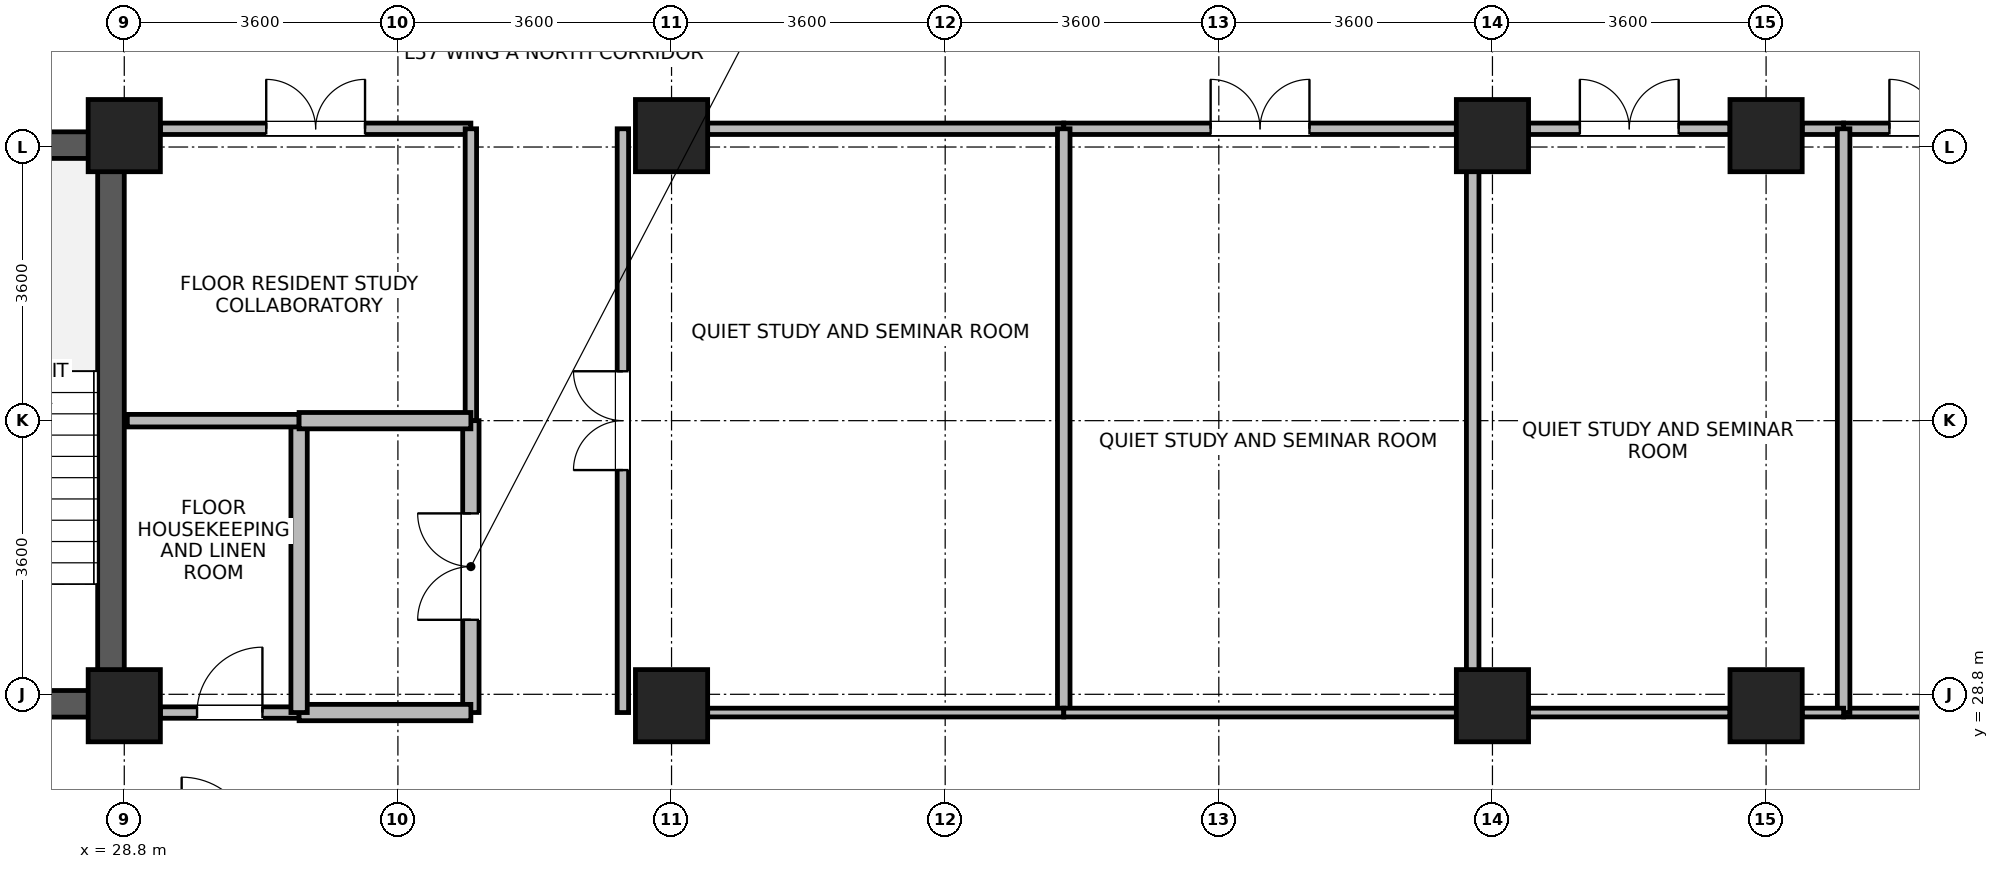
"""IFC4 building model, lengths in metres.
Left out: names, types, materials, properties, quantities, classifications, styles, units other than length and angle.
Written with IfcOpenShell. Run it as: python <this file> out.ifc"""

import sys

from ifc_helpers import new_model, si_unit, direction, frame, frame_2d, origin, origin_2d, place, context, subcontext, project, spatial, rectangle, extrude, source, transform, mapped, element, fill, save


model = new_model("IFC4")
c1 = context("Model", 3, precision=1e-05, world=origin(), true_north=direction((0.0, 1.0)))
c2 = subcontext(c1, "Body", "Model", "MODEL_VIEW")
j1 = project(units=[si_unit("LENGTHUNIT", "METRE"), si_unit("PLANEANGLEUNIT", "RADIAN")], contexts=[c1])
p1 = place(None, origin())
s1 = spatial("IfcSite", under=j1, at=p1, CompositionType="ELEMENT")
p2 = place(p1, origin())
s2 = spatial("IfcBuilding", under=s1, at=p2, CompositionType="ELEMENT")
p3 = place(p2, frame((0.0, 0.0, 224.0)))
s3 = spatial("IfcBuildingStorey", under=s2, at=p3, CompositionType="ELEMENT", Elevation=224.0)
p4 = place(p3, frame((28.625, 28.5, 0.0), z_axis=(0.0, 0.0, 1.0), x_axis=(0.0, 1.0, 0.0)))
e1 = element("IfcWall", 1, at=p4, inside=s3, PredefinedType="SHEAR", context=c2, shape_type="SweptSolid", body=[
    extrude(rectangle(XDim=7.7, YDim=0.35, at=frame_2d((3.85, 0.0))), origin(), (0.0, 0.0, 1.0), 3.47),
])
for number, where, z_axis, x_axis in (
    (2, (25.25, 28.675, 0.0), (0.0, 0.0, 1.0), (1.0, 0.0, 0.0)),
    (3, (25.25, 36.025, 0.0), (0.0, 0.0, 1.0), (1.0, 0.0, 0.0)),
):
    element("IfcWall", number, at=place(p3, frame(where, z_axis=z_axis, x_axis=x_axis)), inside=s3, PredefinedType="SHEAR", context=c2, shape_type="SweptSolid", body=[
        extrude(rectangle(XDim=3.2, YDim=0.35, at=frame_2d((1.6, 0.0))), origin(), (0.0, 0.0, 1.0), 3.47),
    ])
m1 = source(origin(), c2, "Body", "SweptSolid", [
    extrude(rectangle(XDim=0.95, YDim=0.95, at=origin_2d()), origin(), (0.0, 0.0, 1.0), 3.7),
])
for number, where, z_axis, x_axis in (
    (4, (28.8, 28.65, 0.0), (0.0, 0.0, 1.0), (1.0, 0.0, 0.0)),
    (5, (28.8, 36.15, 0.0), (0.0, 0.0, 1.0), (1.0, 0.0, 0.0)),
    (6, (36.0, 28.65, 0.0), (0.0, 0.0, 1.0), (1.0, 0.0, 0.0)),
    (7, (36.0, 36.15, 0.0), (0.0, 0.0, 1.0), (1.0, 0.0, 0.0)),
    (8, (46.8, 28.65, 0.0), (0.0, 0.0, 1.0), (1.0, 0.0, 0.0)),
    (9, (46.8, 36.15, 0.0), (0.0, 0.0, 1.0), (1.0, 0.0, 0.0)),
    (10, (50.4, 28.65, 0.0), (0.0, 0.0, 1.0), (1.0, 0.0, 0.0)),
    (11, (50.4, 36.15, 0.0), (0.0, 0.0, 1.0), (1.0, 0.0, 0.0)),
):
    element("IfcColumn", number, at=place(p3, frame(where, z_axis=z_axis, x_axis=x_axis)), inside=s3, PredefinedType="COLUMN", context=c2, shape_type="MappedRepresentation", body=[
        mapped(m1, transform((0.0, 0.0, 0.0), x_axis=(1.0, 0.0, 0.0), y_axis=(0.0, 1.0, 0.0), z_axis=(0.0, 0.0, 1.0), scale=1.0)),
    ])
p5 = place(p3, frame((51.42, 36.24, 0.0), z_axis=(0.0, 0.0, 1.0), x_axis=(1.0, 0.0, 0.0)))
e12 = element("IfcWall", 12, at=p5, inside=s3, PredefinedType="PARTITIONING", context=c2, shape_type="SweptSolid", body=[
    extrude(rectangle(XDim=2.505, YDim=0.15, at=frame_2d((1.252, 0.0))), origin(), (0.0, 0.0, 1.0), 2.9),
])
p6 = place(p5, frame((0.603, 0.0, 0.0)))
e13 = element("IfcOpeningElement", 13, at=p6, cuts=e12, PredefinedType="OPENING", context=c2, shape_type="SweptSolid", body=[
    extrude(rectangle(XDim=1.3, YDim=2.12, at=frame_2d((0.65, 1.06))), frame((0.0, 0.085, 0.0), z_axis=(0.0, -1.0, 0.0), x_axis=(1.0, 0.0, 0.0)), (0.0, 0.0, 1.0), 0.17),
])
p7 = place(p3, frame((35.36, 28.56, 0.0), z_axis=(0.0, 0.0, 1.0), x_axis=(0.0, 1.0, 0.0)))
e14 = element("IfcWall", 14, at=p7, inside=s3, PredefinedType="PARTITIONING", context=c2, shape_type="SweptSolid", body=[
    extrude(rectangle(XDim=7.68, YDim=0.15, at=frame_2d((3.84, 0.0))), origin(), (0.0, 0.0, 1.0), 3.45),
])
p8 = place(p7, frame((3.19, 0.0, 0.0)))
e15 = element("IfcOpeningElement", 15, at=p8, cuts=e14, PredefinedType="OPENING", context=c2, shape_type="SweptSolid", body=[
    extrude(rectangle(XDim=1.3, YDim=2.12, at=frame_2d((0.65, 1.06))), frame((0.0, 0.085, 0.0), z_axis=(0.0, -1.0, 0.0), x_axis=(1.0, 0.0, 0.0)), (0.0, 0.0, 1.0), 0.17),
])
p9 = place(p3, frame((36.475, 36.24, 0.0), z_axis=(0.0, 0.0, 1.0), x_axis=(1.0, 0.0, 0.0)))
e16 = element("IfcWall", 16, at=p9, inside=s3, PredefinedType="PARTITIONING", context=c2, shape_type="SweptSolid", body=[
    extrude(rectangle(XDim=4.685, YDim=0.15, at=frame_2d((2.342, 0.0))), origin(), (0.0, 0.0, 1.0), 2.9),
])
p10 = place(p3, frame((41.16, 36.24, 0.0), z_axis=(0.0, 0.0, 1.0), x_axis=(1.0, 0.0, 0.0)))
e17 = element("IfcWall", 17, at=p10, inside=s3, PredefinedType="PARTITIONING", context=c2, shape_type="SweptSolid", body=[
    extrude(rectangle(XDim=5.165, YDim=0.15, at=frame_2d((2.583, 0.0))), origin(), (0.0, 0.0, 1.0), 2.9),
])
p11 = place(p10, frame((1.933, 0.0, 0.0)))
e18 = element("IfcOpeningElement", 18, at=p11, cuts=e17, PredefinedType="OPENING", context=c2, shape_type="SweptSolid", body=[
    extrude(rectangle(XDim=1.3, YDim=2.12, at=frame_2d((0.65, 1.06))), frame((0.0, 0.085, 0.0), z_axis=(0.0, -1.0, 0.0), x_axis=(1.0, 0.0, 0.0)), (0.0, 0.0, 1.0), 0.17),
])
p12 = place(p3, frame((47.275, 36.24, 0.0), z_axis=(0.0, 0.0, 1.0), x_axis=(1.0, 0.0, 0.0)))
e19 = element("IfcWall", 19, at=p12, inside=s3, PredefinedType="PARTITIONING", context=c2, shape_type="SweptSolid", body=[
    extrude(rectangle(XDim=2.65, YDim=0.15, at=frame_2d((1.325, 0.0))), origin(), (0.0, 0.0, 1.0), 2.9),
])
p13 = place(p12, frame((0.675, 0.0, 0.0)))
e20 = element("IfcOpeningElement", 20, at=p13, cuts=e19, PredefinedType="OPENING", context=c2, shape_type="SweptSolid", body=[
    extrude(rectangle(XDim=1.3, YDim=2.12, at=frame_2d((0.65, 1.06))), frame((0.0, 0.085, 0.0), z_axis=(0.0, -1.0, 0.0), x_axis=(1.0, 0.0, 0.0)), (0.0, 0.0, 1.0), 0.17),
])
p14 = place(p3, frame((50.875, 36.24, 0.0), z_axis=(0.0, 0.0, 1.0), x_axis=(1.0, 0.0, 0.0)))
e21 = element("IfcWall", 21, at=p14, inside=s3, PredefinedType="PARTITIONING", context=c2, shape_type="SweptSolid", body=[
    extrude(rectangle(XDim=0.545, YDim=0.15, at=frame_2d((0.272, 0.0))), origin(), (0.0, 0.0, 1.0), 2.9),
])
p15 = place(p3, frame((29.275, 36.24, 0.0), z_axis=(0.0, 0.0, 1.0), x_axis=(1.0, 0.0, 0.0)))
e22 = element("IfcWall", 22, at=p15, inside=s3, PredefinedType="PARTITIONING", context=c2, shape_type="SweptSolid", body=[
    extrude(rectangle(XDim=4.085, YDim=0.15, at=frame_2d((2.042, 0.0))), origin(), (0.0, 0.0, 1.0), 2.9),
])
p16 = place(p15, frame((1.393, 0.0, 0.0)))
e23 = element("IfcOpeningElement", 23, at=p16, cuts=e22, PredefinedType="OPENING", context=c2, shape_type="SweptSolid", body=[
    extrude(rectangle(XDim=1.3, YDim=2.12, at=frame_2d((0.65, 1.06))), frame((0.0, 0.085, 0.0), z_axis=(0.0, -1.0, 0.0), x_axis=(1.0, 0.0, 0.0)), (0.0, 0.0, 1.0), 0.17),
])
p17 = place(p3, frame((33.36, 32.4, 0.0), z_axis=(0.0, 0.0, 1.0), x_axis=(0.0, 1.0, 0.0)))
e24 = element("IfcWall", 24, at=p17, inside=s3, PredefinedType="PARTITIONING", context=c2, shape_type="SweptSolid", body=[
    extrude(rectangle(XDim=3.84, YDim=0.15, at=frame_2d((1.92, 0.0))), origin(), (0.0, 0.0, 1.0), 3.45),
])
p18 = place(p3, frame((33.36, 28.56, 0.0), z_axis=(0.0, 0.0, 1.0), x_axis=(0.0, 1.0, 0.0)))
e25 = element("IfcWall", 25, at=p18, inside=s3, PredefinedType="PARTITIONING", context=c2, shape_type="SweptSolid", body=[
    extrude(rectangle(XDim=3.84, YDim=0.215, at=frame_2d((1.92, 0.0))), origin(), (0.0, 0.0, 1.0), 3.45),
])
p19 = place(p18, frame((1.22, 0.0, 0.0)))
e26 = element("IfcOpeningElement", 26, at=p19, cuts=e25, PredefinedType="OPENING", context=c2, shape_type="SweptSolid", body=[
    extrude(rectangle(XDim=1.4, YDim=2.15, at=frame_2d((0.7, 1.075))), frame((0.0, 0.118, 0.0), z_axis=(0.0, -1.0, 0.0), x_axis=(1.0, 0.0, 0.0)), (0.0, 0.0, 1.0), 0.235),
])
p20 = place(p3, frame((29.275, 28.56, 0.0), z_axis=(0.0, 0.0, 1.0), x_axis=(1.0, 0.0, 0.0)))
e27 = element("IfcWall", 27, at=p20, inside=s3, PredefinedType="PARTITIONING", context=c2, shape_type="SweptSolid", body=[
    extrude(rectangle(XDim=1.825, YDim=0.15, at=frame_2d((0.913, 0.0))), origin(), (0.0, 0.0, 1.0), 2.9),
])
p21 = place(p20, frame((0.482, 0.0, 0.0)))
e28 = element("IfcOpeningElement", 28, at=p21, cuts=e27, PredefinedType="OPENING", context=c2, shape_type="SweptSolid", body=[
    extrude(rectangle(XDim=0.86, YDim=2.02, at=frame_2d((0.43, 1.01))), frame((0.0, 0.085, 0.0), z_axis=(0.0, -1.0, 0.0), x_axis=(1.0, 0.0, 0.0)), (0.0, 0.0, 1.0), 0.17),
])
p22 = place(p3, frame((31.1, 28.56, 0.0), z_axis=(0.0, 0.0, 1.0), x_axis=(1.0, 0.0, 0.0)))
e29 = element("IfcWall", 29, at=p22, inside=s3, PredefinedType="PARTITIONING", context=c2, shape_type="SweptSolid", body=[
    extrude(rectangle(XDim=2.26, YDim=0.215, at=frame_2d((1.13, 0.0))), origin(), (0.0, 0.0, 1.0), 2.9),
])
p23 = place(p3, frame((51.42, 28.56, 0.0), z_axis=(0.0, 0.0, 1.0), x_axis=(1.0, 0.0, 0.0)))
e30 = element("IfcWall", 30, at=p23, inside=s3, PredefinedType="PARTITIONING", context=c2, shape_type="SweptSolid", body=[
    extrude(rectangle(XDim=2.505, YDim=0.115, at=frame_2d((1.252, 0.0))), origin(), (0.0, 0.0, 1.0), 2.9),
])
for number, where, z_axis, x_axis in (
    (31, (41.16, 28.56, 0.0), (0.0, 0.0, 1.0), (0.0, 1.0, 0.0)),
    (32, (46.54, 28.56, 0.0), (0.0, 0.0, 1.0), (0.0, 1.0, 0.0)),
    (33, (51.42, 28.56, 0.0), (0.0, 0.0, 1.0), (0.0, 1.0, 0.0)),
):
    element("IfcWall", number, at=place(p3, frame(where, z_axis=z_axis, x_axis=x_axis)), inside=s3, PredefinedType="PARTITIONING", context=c2, shape_type="SweptSolid", body=[
        extrude(rectangle(XDim=7.68, YDim=0.165, at=frame_2d((3.84, 0.0))), origin(), (0.0, 0.0, 1.0), 3.45),
    ])
p24 = place(p3, frame((36.475, 28.56, 0.0), z_axis=(0.0, 0.0, 1.0), x_axis=(1.0, 0.0, 0.0)))
e34 = element("IfcWall", 34, at=p24, inside=s3, PredefinedType="PARTITIONING", context=c2, shape_type="SweptSolid", body=[
    extrude(rectangle(XDim=4.685, YDim=0.115, at=frame_2d((2.342, 0.0))), origin(), (0.0, 0.0, 1.0), 2.9),
])
p25 = place(p3, frame((41.16, 28.56, 0.0), z_axis=(0.0, 0.0, 1.0), x_axis=(1.0, 0.0, 0.0)))
e35 = element("IfcWall", 35, at=p25, inside=s3, PredefinedType="PARTITIONING", context=c2, shape_type="SweptSolid", body=[
    extrude(rectangle(XDim=5.165, YDim=0.115, at=frame_2d((2.583, 0.0))), origin(), (0.0, 0.0, 1.0), 2.9),
])
p26 = place(p3, frame((47.275, 28.56, 0.0), z_axis=(0.0, 0.0, 1.0), x_axis=(1.0, 0.0, 0.0)))
e36 = element("IfcWall", 36, at=p26, inside=s3, PredefinedType="PARTITIONING", context=c2, shape_type="SweptSolid", body=[
    extrude(rectangle(XDim=2.65, YDim=0.115, at=frame_2d((1.325, 0.0))), origin(), (0.0, 0.0, 1.0), 2.9),
])
p27 = place(p3, frame((50.875, 28.56, 0.0), z_axis=(0.0, 0.0, 1.0), x_axis=(1.0, 0.0, 0.0)))
e37 = element("IfcWall", 37, at=p27, inside=s3, PredefinedType="PARTITIONING", context=c2, shape_type="SweptSolid", body=[
    extrude(rectangle(XDim=0.545, YDim=0.115, at=frame_2d((0.272, 0.0))), origin(), (0.0, 0.0, 1.0), 2.9),
])
p28 = place(p3, frame((31.1, 28.56, 0.0), z_axis=(0.0, 0.0, 1.0), x_axis=(0.0, 1.0, 0.0)))
e38 = element("IfcWall", 38, at=p28, inside=s3, PredefinedType="PARTITIONING", context=c2, shape_type="SweptSolid", body=[
    extrude(rectangle(XDim=3.84, YDim=0.215, at=frame_2d((1.92, 0.0))), origin(), (0.0, 0.0, 1.0), 3.45),
])
p29 = place(p3, frame((28.84, 32.4, 0.0), z_axis=(0.0, 0.0, 1.0), x_axis=(1.0, 0.0, 0.0)))
e39 = element("IfcWall", 39, at=p29, inside=s3, PredefinedType="PARTITIONING", context=c2, shape_type="SweptSolid", body=[
    extrude(rectangle(XDim=2.26, YDim=0.165, at=frame_2d((1.13, 0.0))), origin(), (0.0, 0.0, 1.0), 3.45),
])
p30 = place(p3, frame((31.1, 32.4, 0.0), z_axis=(0.0, 0.0, 1.0), x_axis=(1.0, 0.0, 0.0)))
e40 = element("IfcWall", 40, at=p30, inside=s3, PredefinedType="PARTITIONING", context=c2, shape_type="SweptSolid", body=[
    extrude(rectangle(XDim=2.26, YDim=0.215, at=frame_2d((1.13, 0.0))), origin(), (0.0, 0.0, 1.0), 3.45),
])
p31 = place(p6, origin())
e41 = element("IfcDoor", 41, at=p31, inside=s3, OperationType="DOUBLE_DOOR_SINGLE_SWING", PredefinedType="DOOR", context=c2, shape_type="SweptSolid", body=[
    extrude(rectangle(XDim=1.3, YDim=2.12, at=frame_2d((0.65, 1.06))), frame((0.0, 0.025, 0.0), z_axis=(0.0, -1.0, 0.0), x_axis=(1.0, 0.0, 0.0)), (0.0, 0.0, 1.0), 0.05),
])
fill(e13, e41)
p32 = place(p8, origin())
e42 = element("IfcDoor", 42, at=p32, inside=s3, OperationType="DOUBLE_DOOR_SINGLE_SWING", PredefinedType="DOOR", context=c2, shape_type="SweptSolid", body=[
    extrude(rectangle(XDim=1.3, YDim=2.12, at=frame_2d((0.65, 1.06))), frame((0.0, 0.025, 0.0), z_axis=(0.0, -1.0, 0.0), x_axis=(1.0, 0.0, 0.0)), (0.0, 0.0, 1.0), 0.05),
])
fill(e15, e42)
p33 = place(p11, origin())
e43 = element("IfcDoor", 43, at=p33, inside=s3, OperationType="DOUBLE_DOOR_SINGLE_SWING", PredefinedType="DOOR", context=c2, shape_type="SweptSolid", body=[
    extrude(rectangle(XDim=1.3, YDim=2.12, at=frame_2d((0.65, 1.06))), frame((0.0, 0.025, 0.0), z_axis=(0.0, -1.0, 0.0), x_axis=(1.0, 0.0, 0.0)), (0.0, 0.0, 1.0), 0.05),
])
fill(e18, e43)
p34 = place(p13, origin())
e44 = element("IfcDoor", 44, at=p34, inside=s3, OperationType="DOUBLE_DOOR_SINGLE_SWING", PredefinedType="DOOR", context=c2, shape_type="SweptSolid", body=[
    extrude(rectangle(XDim=1.3, YDim=2.12, at=frame_2d((0.65, 1.06))), frame((0.0, 0.025, 0.0), z_axis=(0.0, -1.0, 0.0), x_axis=(1.0, 0.0, 0.0)), (0.0, 0.0, 1.0), 0.05),
])
fill(e20, e44)
p35 = place(p16, origin())
e45 = element("IfcDoor", 45, at=p35, inside=s3, OperationType="DOUBLE_DOOR_SINGLE_SWING", PredefinedType="DOOR", context=c2, shape_type="SweptSolid", body=[
    extrude(rectangle(XDim=1.3, YDim=2.12, at=frame_2d((0.65, 1.06))), frame((0.0, 0.025, 0.0), z_axis=(0.0, -1.0, 0.0), x_axis=(1.0, 0.0, 0.0)), (0.0, 0.0, 1.0), 0.05),
])
fill(e23, e45)
p36 = place(p19, origin())
e46 = element("IfcDoor", 46, at=p36, inside=s3, OperationType="DOUBLE_DOOR_SINGLE_SWING", PredefinedType="DOOR", context=c2, shape_type="SweptSolid", body=[
    extrude(rectangle(XDim=1.4, YDim=2.15, at=frame_2d((0.7, 1.075))), frame((0.0, 0.025, 0.0), z_axis=(0.0, -1.0, 0.0), x_axis=(1.0, 0.0, 0.0)), (0.0, 0.0, 1.0), 0.05),
])
fill(e26, e46)
p37 = place(p21, origin())
e47 = element("IfcDoor", 47, at=p37, inside=s3, OperationType="SINGLE_SWING_RIGHT", PredefinedType="DOOR", context=c2, shape_type="SweptSolid", body=[
    extrude(rectangle(XDim=0.86, YDim=2.02, at=frame_2d((0.43, 1.01))), frame((0.0, 0.025, 0.0), z_axis=(0.0, -1.0, 0.0), x_axis=(1.0, 0.0, 0.0)), (0.0, 0.0, 1.0), 0.05),
])
fill(e28, e47)
save(model, sys.argv[1])
